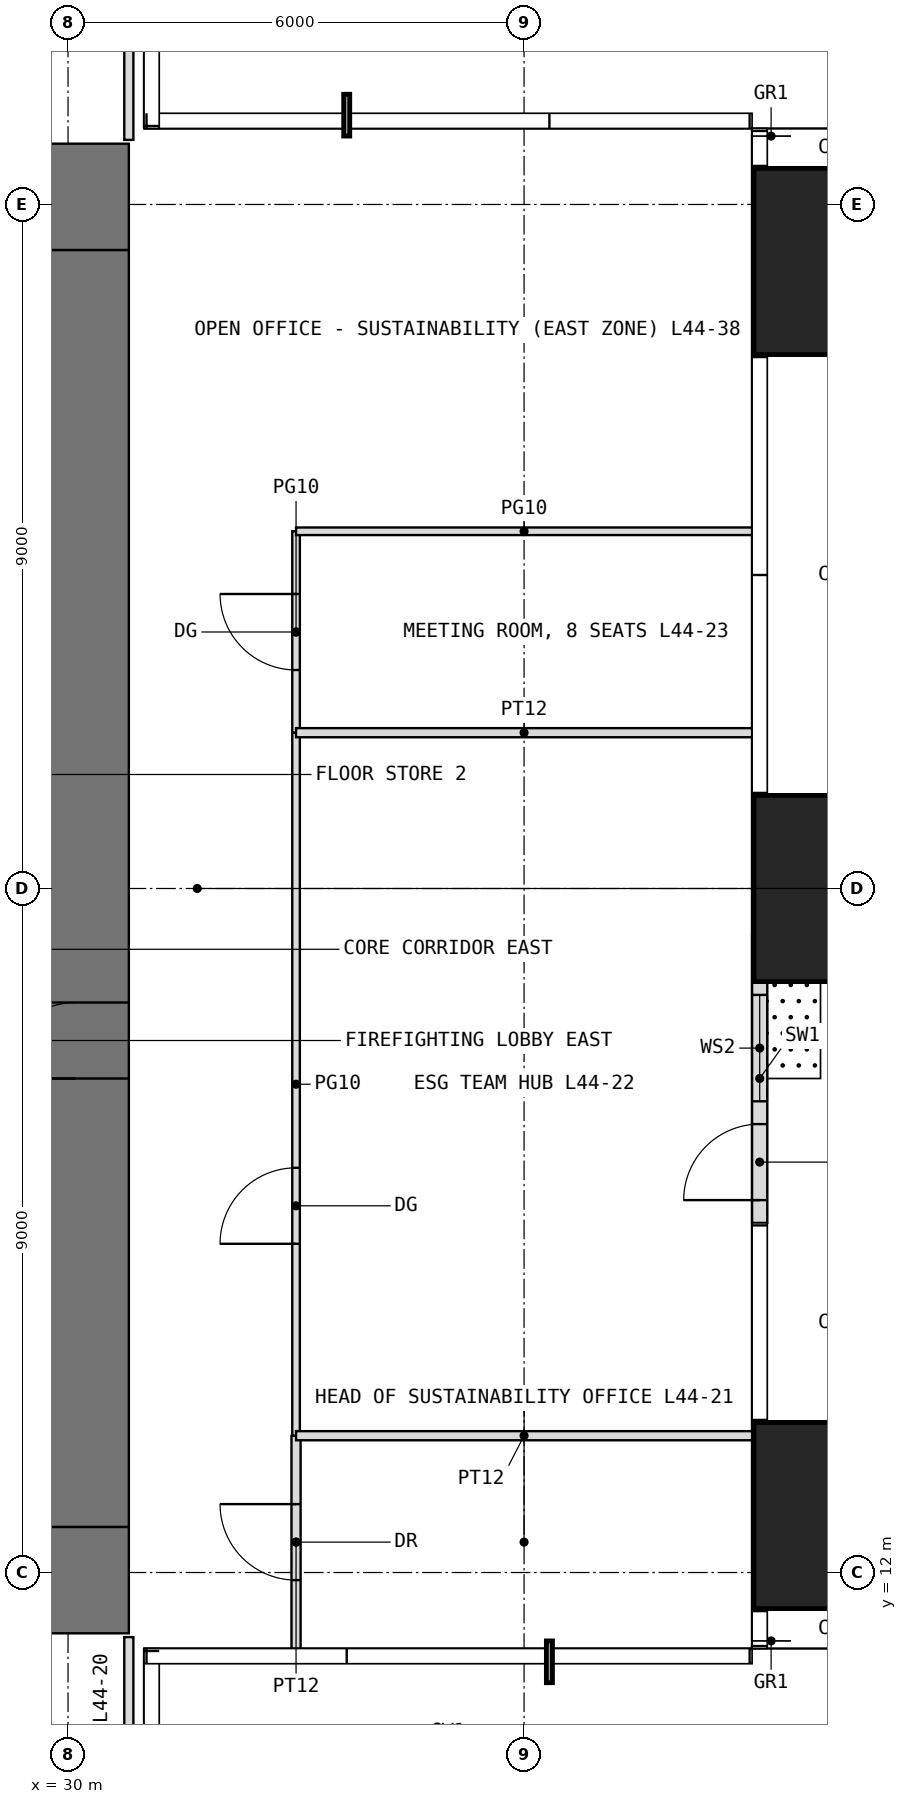
"""IFC4 building model, lengths in metres.
Left out: names, types, materials, properties, quantities, classifications, styles, units other than length and angle.
Written with IfcOpenShell. Run it as: python <this file> out.ifc"""

import sys

from ifc_helpers import new_model, si_unit, direction, frame, frame_2d, origin, origin_2d, place, context, subcontext, project, spatial, rectangle, extrude, element, fill, save


model = new_model("IFC4")
c1 = context("Model", 3, precision=1e-05, world=origin(), true_north=direction((0.0, 1.0)))
c2 = subcontext(c1, "Body", "Model", "MODEL_VIEW")
j1 = project(units=[si_unit("LENGTHUNIT", "METRE"), si_unit("PLANEANGLEUNIT", "RADIAN")], contexts=[c1])
p1 = place(None, origin())
s1 = spatial("IfcSite", under=j1, at=p1, CompositionType="ELEMENT")
p2 = place(p1, origin())
s2 = spatial("IfcBuilding", under=s1, at=p2, CompositionType="ELEMENT")
p3 = place(p2, frame((0.0, 0.0, 186.5)))
s3 = spatial("IfcBuildingStorey", under=s2, at=p3, CompositionType="ELEMENT", Elevation=186.5)
for number, where, z_axis, x_axis in (
    (1, (40.25, 12.75, 0.0), (0.0, 0.0, 1.0), (1.0, 0.0, 0.0)),
    (2, (40.25, 21.0, 0.0), (0.0, 0.0, 1.0), (1.0, 0.0, 0.0)),
    (3, (40.25, 29.25, 0.0), (0.0, 0.0, 1.0), (1.0, 0.0, 0.0)),
):
    element("IfcColumn", number, at=place(p3, frame(where, z_axis=z_axis, x_axis=x_axis)), inside=s3, PredefinedType="COLUMN", context=c2, shape_type="SweptSolid", body=[
        extrude(rectangle(XDim=2.45, YDim=2.45, at=origin_2d()), origin(), (0.0, 0.0, 1.0), 4.0),
    ])
p4 = place(p3, frame((39.1, 16.6, 0.0), z_axis=(0.0, 0.0, 1.0), x_axis=(0.0, 1.0, 0.0)))
e4 = element("IfcWall", 4, at=p4, inside=s3, PredefinedType="USERDEFINED", context=c2, shape_type="SweptSolid", body=[
    extrude(rectangle(XDim=3.8, YDim=0.2, at=frame_2d((1.9, 0.0))), origin(), (0.0, 0.0, 1.0), 3.75),
])
p5 = place(p4, frame((0.3, 0.0, 0.0)))
e5 = element("IfcOpeningElement", 5, at=p5, cuts=e4, PredefinedType="OPENING", context=c2, shape_type="SweptSolid", body=[
    extrude(rectangle(XDim=1.0, YDim=2.4, at=frame_2d((0.5, 1.2))), frame((0.0, 0.11, 0.0), z_axis=(0.0, -1.0, 0.0), x_axis=(1.0, 0.0, 0.0)), (0.0, 0.0, 1.0), 0.22),
])
p6 = place(p4, frame((1.6, 0.0, 0.3)))
e6 = element("IfcOpeningElement", 6, at=p6, cuts=e4, PredefinedType="OPENING", context=c2, shape_type="SweptSolid", body=[
    extrude(rectangle(XDim=1.4, YDim=2.7, at=frame_2d((0.7, 1.35))), frame((0.0, 0.11, 0.0), z_axis=(0.0, -1.0, 0.0), x_axis=(1.0, 0.0, 0.0)), (0.0, 0.0, 1.0), 0.22),
])
p7 = place(p3, frame((11.2, 11.9, -0.05), z_axis=(0.0, 0.0, 1.0), x_axis=(1.0, 0.0, 0.0)))
e7 = element("IfcWall", 7, at=p7, inside=s3, PredefinedType="SHEAR", context=c2, shape_type="SweptSolid", body=[
    extrude(rectangle(XDim=19.6, YDim=1.4, at=frame_2d((9.8, 0.0))), origin(), (0.0, 0.0, 1.0), 4.0),
])
p8 = place(p7, frame((8.8, 0.0, 0.05)))
e8 = element("IfcOpeningElement", 8, at=p8, cuts=e7, PredefinedType="OPENING", context=c2, shape_type="SweptSolid", body=[
    extrude(rectangle(XDim=2.0, YDim=2.2, at=frame_2d((1.0, 1.1))), frame((0.0, 0.71, 0.0), z_axis=(0.0, -1.0, 0.0), x_axis=(1.0, 0.0, 0.0)), (0.0, 0.0, 1.0), 1.42),
])
p9 = place(p3, frame((11.2, 30.1, -0.05), z_axis=(0.0, 0.0, 1.0), x_axis=(1.0, 0.0, 0.0)))
e9 = element("IfcWall", 9, at=p9, inside=s3, PredefinedType="SHEAR", context=c2, shape_type="SweptSolid", body=[
    extrude(rectangle(XDim=19.6, YDim=1.4, at=frame_2d((9.8, 0.0))), origin(), (0.0, 0.0, 1.0), 4.0),
])
p10 = place(p9, frame((8.8, 0.0, 0.05)))
e10 = element("IfcOpeningElement", 10, at=p10, cuts=e9, PredefinedType="OPENING", context=c2, shape_type="SweptSolid", body=[
    extrude(rectangle(XDim=2.0, YDim=2.2, at=frame_2d((1.0, 1.1))), frame((0.0, 0.71, 0.0), z_axis=(0.0, -1.0, 0.0), x_axis=(1.0, 0.0, 0.0)), (0.0, 0.0, 1.0), 1.42),
])
p11 = place(p3, frame((30.1, 12.6, -0.05), z_axis=(0.0, 0.0, 1.0), x_axis=(0.0, 1.0, 0.0)))
e11 = element("IfcWall", 11, at=p11, inside=s3, PredefinedType="SHEAR", context=c2, shape_type="SweptSolid", body=[
    extrude(rectangle(XDim=16.8, YDim=1.4, at=frame_2d((8.4, 0.0))), origin(), (0.0, 0.0, 1.0), 4.0),
])
p12 = place(p11, frame((5.9, 0.0, 0.05)))
e12 = element("IfcOpeningElement", 12, at=p12, cuts=e11, PredefinedType="OPENING", context=c2, shape_type="SweptSolid", body=[
    extrude(rectangle(XDim=1.0, YDim=2.2, at=frame_2d((0.5, 1.1))), frame((0.0, 0.71, 0.0), z_axis=(0.0, -1.0, 0.0), x_axis=(1.0, 0.0, 0.0)), (0.0, 0.0, 1.0), 1.42),
])
p13 = place(p3, frame((30.8, 6.7, 0.0), z_axis=(0.0, 0.0, 1.0), x_axis=(0.0, 1.0, 0.0)))
e13 = element("IfcWall", 13, at=p13, inside=s3, PredefinedType="PARTITIONING", context=c2, shape_type="SweptSolid", body=[
    extrude(rectangle(XDim=4.45, YDim=0.12, at=frame_2d((2.225, 0.0))), origin(), (0.0, 0.0, 1.0), 3.75),
])
p14 = place(p3, frame((30.8, 30.85, 0.0), z_axis=(0.0, 0.0, 1.0), x_axis=(0.0, 1.0, 0.0)))
e14 = element("IfcWall", 14, at=p14, inside=s3, PredefinedType="PARTITIONING", context=c2, shape_type="SweptSolid", body=[
    extrude(rectangle(XDim=3.15, YDim=0.12, at=frame_2d((1.575, 0.0))), origin(), (0.0, 0.0, 1.0), 3.75),
])
p15 = place(p3, frame((33.0, 11.0, 0.0), z_axis=(0.0, 0.0, 1.0), x_axis=(0.0, 1.0, 0.0)))
e15 = element("IfcWall", 15, at=p15, inside=s3, PredefinedType="PARTITIONING", context=c2, shape_type="SweptSolid", body=[
    extrude(rectangle(XDim=2.8, YDim=0.12, at=frame_2d((1.4, 0.0))), origin(), (0.0, 0.0, 1.0), 3.75),
])
p16 = place(p15, frame((0.9, 0.0, 0.0)))
e16 = element("IfcOpeningElement", 16, at=p16, cuts=e15, PredefinedType="OPENING", context=c2, shape_type="SweptSolid", body=[
    extrude(rectangle(XDim=1.0, YDim=2.2, at=frame_2d((0.5, 1.1))), frame((0.0, 0.07, 0.0), z_axis=(0.0, -1.0, 0.0), x_axis=(1.0, 0.0, 0.0)), (0.0, 0.0, 1.0), 0.14),
])
p17 = place(p3, frame((33.0, 13.8, 0.0), z_axis=(0.0, 0.0, 1.0), x_axis=(0.0, 1.0, 0.0)))
e17 = element("IfcWall", 17, at=p17, inside=s3, PredefinedType="PARTITIONING", context=c2, shape_type="SweptSolid", body=[
    extrude(rectangle(XDim=9.25, YDim=0.1, at=frame_2d((4.625, 0.0))), origin(), (0.0, 0.0, 1.0), 3.75),
])
p18 = place(p17, frame((2.525, 0.0, 0.0)))
e18 = element("IfcOpeningElement", 18, at=p18, cuts=e17, PredefinedType="OPENING", context=c2, shape_type="SweptSolid", body=[
    extrude(rectangle(XDim=1.0, YDim=2.4, at=frame_2d((0.5, 1.2))), frame((0.0, 0.06, 0.0), z_axis=(0.0, -1.0, 0.0), x_axis=(1.0, 0.0, 0.0)), (0.0, 0.0, 1.0), 0.12),
])
p19 = place(p3, frame((33.0, 13.8, 0.0), z_axis=(0.0, 0.0, 1.0), x_axis=(1.0, 0.0, 0.0)))
e19 = element("IfcWall", 19, at=p19, inside=s3, PredefinedType="PARTITIONING", context=c2, shape_type="SweptSolid", body=[
    extrude(rectangle(XDim=6.0, YDim=0.12, at=frame_2d((3.0, 0.0))), origin(), (0.0, 0.0, 1.0), 3.75),
])
p20 = place(p3, frame((33.0, 23.05, 0.0), z_axis=(0.0, 0.0, 1.0), x_axis=(0.0, 1.0, 0.0)))
e20 = element("IfcWall", 20, at=p20, inside=s3, PredefinedType="PARTITIONING", context=c2, shape_type="SweptSolid", body=[
    extrude(rectangle(XDim=2.65, YDim=0.1, at=frame_2d((1.325, 0.0))), origin(), (0.0, 0.0, 1.0), 3.75),
])
p21 = place(p20, frame((0.825, 0.0, 0.0)))
e21 = element("IfcOpeningElement", 21, at=p21, cuts=e20, PredefinedType="OPENING", context=c2, shape_type="SweptSolid", body=[
    extrude(rectangle(XDim=1.0, YDim=2.4, at=frame_2d((0.5, 1.2))), frame((0.0, 0.06, 0.0), z_axis=(0.0, -1.0, 0.0), x_axis=(1.0, 0.0, 0.0)), (0.0, 0.0, 1.0), 0.12),
])
p22 = place(p3, frame((33.0, 23.05, 0.0), z_axis=(0.0, 0.0, 1.0), x_axis=(1.0, 0.0, 0.0)))
e22 = element("IfcWall", 22, at=p22, inside=s3, PredefinedType="PARTITIONING", context=c2, shape_type="SweptSolid", body=[
    extrude(rectangle(XDim=6.0, YDim=0.12, at=frame_2d((3.0, 0.0))), origin(), (0.0, 0.0, 1.0), 3.75),
])
p23 = place(p3, frame((33.0, 25.7, 0.0), z_axis=(0.0, 0.0, 1.0), x_axis=(1.0, 0.0, 0.0)))
e23 = element("IfcWall", 23, at=p23, inside=s3, PredefinedType="PARTITIONING", context=c2, shape_type="SweptSolid", body=[
    extrude(rectangle(XDim=6.0, YDim=0.1, at=frame_2d((3.0, 0.0))), origin(), (0.0, 0.0, 1.0), 3.75),
])
p24 = place(p5, origin())
e24 = element("IfcDoor", 24, at=p24, inside=s3, OperationType="SINGLE_SWING_LEFT", PredefinedType="DOOR", context=c2, shape_type="SweptSolid", body=[
    extrude(rectangle(XDim=1.0, YDim=2.4, at=frame_2d((0.5, 1.2))), frame((0.0, 0.025, 0.0), z_axis=(0.0, -1.0, 0.0), x_axis=(1.0, 0.0, 0.0)), (0.0, 0.0, 1.0), 0.05),
])
fill(e5, e24)
p25 = place(p6, origin())
e25 = element("IfcWindow", 25, at=p25, inside=s3, PartitioningType="SINGLE_PANEL", PredefinedType="WINDOW", context=c2, shape_type="SweptSolid", body=[
    extrude(rectangle(XDim=1.4, YDim=2.7, at=frame_2d((0.7, 1.35))), frame((0.0, 0.03, 0.0), z_axis=(0.0, -1.0, 0.0), x_axis=(1.0, 0.0, 0.0)), (0.0, 0.0, 1.0), 0.06),
])
fill(e6, e25)
p26 = place(p12, origin())
e26 = element("IfcDoor", 26, at=p26, inside=s3, OperationType="SINGLE_SWING_LEFT", PredefinedType="DOOR", context=c2, shape_type="SweptSolid", body=[
    extrude(rectangle(XDim=1.0, YDim=2.2, at=frame_2d((0.5, 1.1))), frame((0.0, 0.025, 0.0), z_axis=(0.0, -1.0, 0.0), x_axis=(1.0, 0.0, 0.0)), (0.0, 0.0, 1.0), 0.05),
])
fill(e12, e26)
p27 = place(p16, origin())
e27 = element("IfcDoor", 27, at=p27, inside=s3, OperationType="SINGLE_SWING_RIGHT", PredefinedType="DOOR", context=c2, shape_type="SweptSolid", body=[
    extrude(rectangle(XDim=1.0, YDim=2.2, at=frame_2d((0.5, 1.1))), frame((0.0, 0.025, 0.0), z_axis=(0.0, -1.0, 0.0), x_axis=(1.0, 0.0, 0.0)), (0.0, 0.0, 1.0), 0.05),
])
fill(e16, e27)
p28 = place(p18, origin())
e28 = element("IfcDoor", 28, at=p28, inside=s3, OperationType="SINGLE_SWING_LEFT", PredefinedType="DOOR", context=c2, shape_type="SweptSolid", body=[
    extrude(rectangle(XDim=1.0, YDim=2.4, at=frame_2d((0.5, 1.2))), frame((0.0, 0.025, 0.0), z_axis=(0.0, -1.0, 0.0), x_axis=(1.0, 0.0, 0.0)), (0.0, 0.0, 1.0), 0.05),
])
fill(e18, e28)
p29 = place(p21, origin())
e29 = element("IfcDoor", 29, at=p29, inside=s3, OperationType="SINGLE_SWING_RIGHT", PredefinedType="DOOR", context=c2, shape_type="SweptSolid", body=[
    extrude(rectangle(XDim=1.0, YDim=2.4, at=frame_2d((0.5, 1.2))), frame((0.0, 0.025, 0.0), z_axis=(0.0, -1.0, 0.0), x_axis=(1.0, 0.0, 0.0)), (0.0, 0.0, 1.0), 0.05),
])
fill(e21, e29)
save(model, sys.argv[1])
